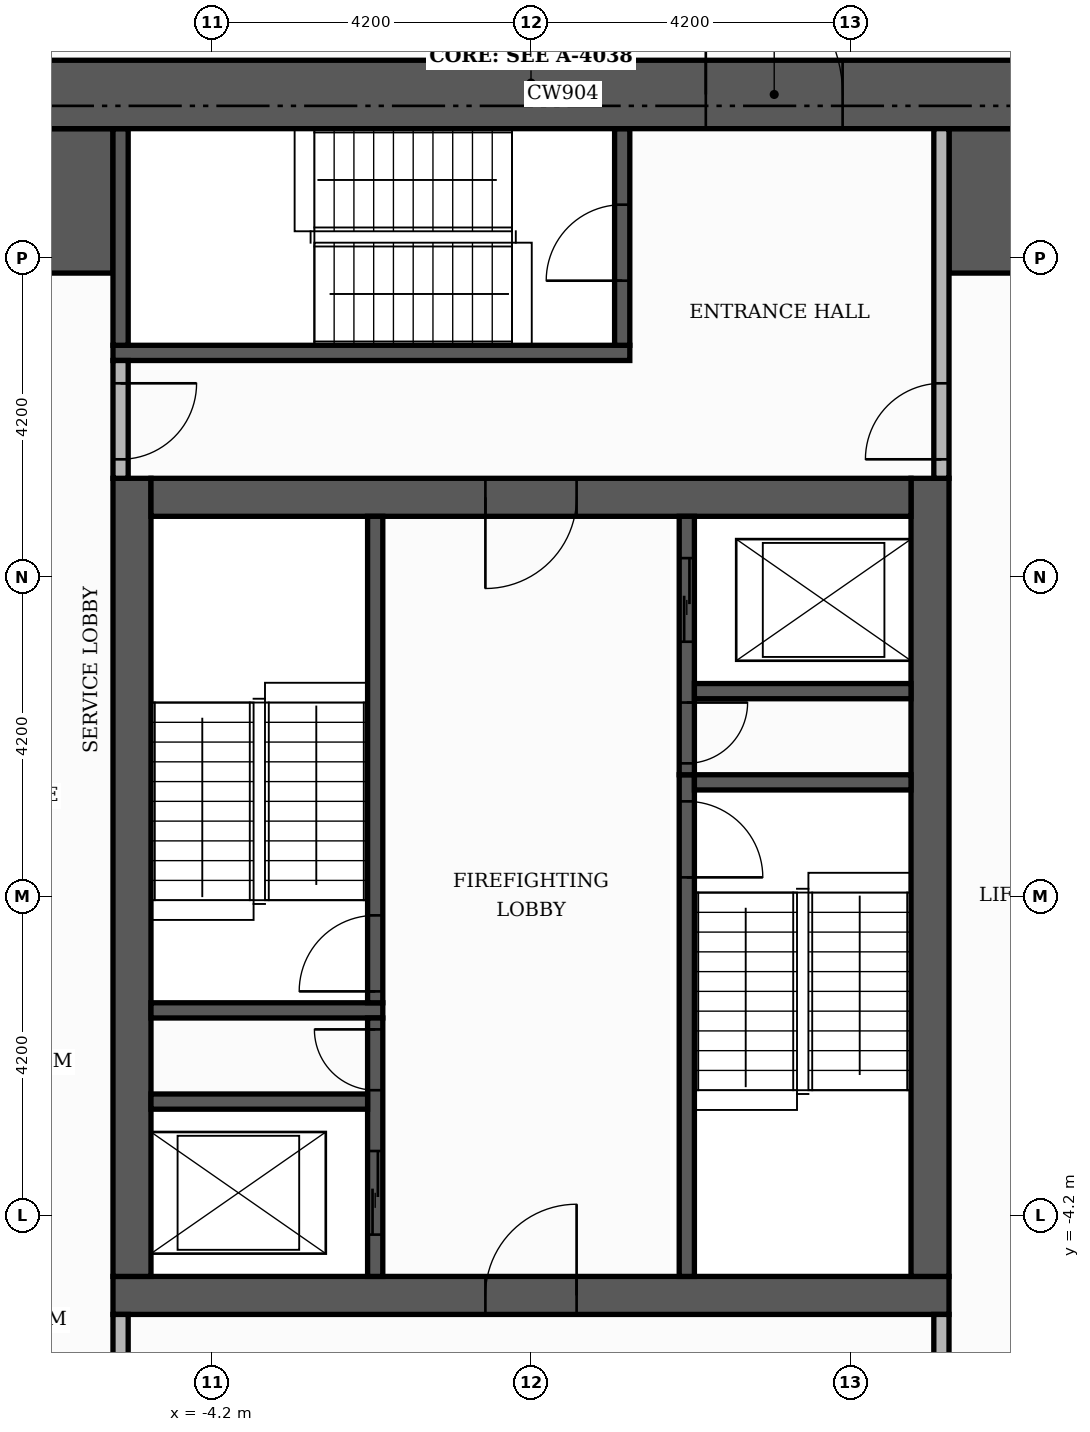
"""IFC4 building model, lengths in metres.
Left out: names, types, materials, properties, quantities, classifications, styles, units other than length and angle.
Written with IfcOpenShell. Run it as: python <this file> out.ifc"""

import sys

from ifc_helpers import new_model, si_unit, direction, frame, frame_2d, origin, place, context, subcontext, project, spatial, rectangle, extrude, element, fill, save


model = new_model("IFC4")
c1 = context("Model", 3, precision=1e-05, world=origin(), true_north=direction((0.0, 1.0)))
c2 = subcontext(c1, "Body", "Model", "MODEL_VIEW")
j1 = project(units=[si_unit("LENGTHUNIT", "METRE"), si_unit("PLANEANGLEUNIT", "RADIAN")], contexts=[c1])
p1 = place(None, origin())
s1 = spatial("IfcSite", under=j1, at=p1, CompositionType="ELEMENT")
p2 = place(p1, origin())
s2 = spatial("IfcBuilding", under=s1, at=p2, CompositionType="ELEMENT")
p3 = place(p2, frame((0.0, 0.0, 231.3)))
s3 = spatial("IfcBuildingStorey", under=s2, at=p3, CompositionType="ELEMENT", Elevation=231.3)
p4 = place(p3, frame((-5.5, -5.25, 0.0), z_axis=(0.0, 0.0, 1.0), x_axis=(1.0, 0.0, 0.0)))
e1 = element("IfcWall", 1, at=p4, inside=s3, PredefinedType="SHEAR", context=c2, shape_type="SweptSolid", body=[
    extrude(rectangle(XDim=11.0, YDim=0.5, at=frame_2d((5.5, 0.0))), origin(), (0.0, 0.0, 1.0), 3.4),
])
p5 = place(p4, frame((4.9, 0.0, 0.0)))
e2 = element("IfcOpeningElement", 2, at=p5, cuts=e1, PredefinedType="OPENING", context=c2, shape_type="SweptSolid", body=[
    extrude(rectangle(XDim=1.2, YDim=2.1, at=frame_2d((0.6, 1.05))), frame((0.0, 0.26, 0.0), z_axis=(0.0, -1.0, 0.0), x_axis=(1.0, 0.0, 0.0)), (0.0, 0.0, 1.0), 0.52),
])
for number, where, z_axis, x_axis in (
    (3, (-5.25, -5.0, 0.0), (0.0, 0.0, 1.0), (0.0, 1.0, 0.0)),
    (4, (5.25, -5.0, 0.0), (0.0, 0.0, 1.0), (0.0, 1.0, 0.0)),
):
    element("IfcWall", number, at=place(p3, frame(where, z_axis=z_axis, x_axis=x_axis)), inside=s3, PredefinedType="SHEAR", context=c2, shape_type="SweptSolid", body=[
        extrude(rectangle(XDim=10.5, YDim=0.5, at=frame_2d((5.25, 0.0))), origin(), (0.0, 0.0, 1.0), 3.4),
    ])
p6 = place(p3, frame((-5.0, 5.25, 0.0), z_axis=(0.0, 0.0, 1.0), x_axis=(1.0, 0.0, 0.0)))
e5 = element("IfcWall", 5, at=p6, inside=s3, PredefinedType="SHEAR", context=c2, shape_type="SweptSolid", body=[
    extrude(rectangle(XDim=10.0, YDim=0.5, at=frame_2d((5.0, 0.0))), origin(), (0.0, 0.0, 1.0), 3.4),
])
p7 = place(p6, frame((4.4, 0.0, 0.0)))
e6 = element("IfcOpeningElement", 6, at=p7, cuts=e5, PredefinedType="OPENING", context=c2, shape_type="SweptSolid", body=[
    extrude(rectangle(XDim=1.2, YDim=2.1, at=frame_2d((0.6, 1.05))), frame((0.0, 0.26, 0.0), z_axis=(0.0, -1.0, 0.0), x_axis=(1.0, 0.0, 0.0)), (0.0, 0.0, 1.0), 0.52),
])
for number, where, z_axis, x_axis in (
    (7, (-10.1, 9.15, 0.0), (0.0, 0.0, 1.0), (1.0, 0.0, 0.0)),
    (8, (5.5, 9.15, 0.0), (0.0, 0.0, 1.0), (1.0, 0.0, 0.0)),
):
    element("IfcWall", number, at=place(p3, frame(where, z_axis=z_axis, x_axis=x_axis)), inside=s3, PredefinedType="SHEAR", context=c2, shape_type="SweptSolid", body=[
        extrude(rectangle(XDim=4.6, YDim=1.9, at=frame_2d((2.3, 0.0))), origin(), (0.0, 0.0, 1.0), 3.4),
    ])
p8 = place(p3, frame((2.05, -5.0, 0.0), z_axis=(0.0, 0.0, 1.0), x_axis=(0.0, 1.0, 0.0)))
e9 = element("IfcWall", 9, at=p8, inside=s3, PredefinedType="SHEAR", context=c2, shape_type="SweptSolid", body=[
    extrude(rectangle(XDim=6.6, YDim=0.2, at=frame_2d((3.3, 0.0))), origin(), (0.0, 0.0, 1.0), 3.4),
])
p9 = place(p8, frame((5.25, 0.0, 0.0)))
e10 = element("IfcOpeningElement", 10, at=p9, cuts=e9, PredefinedType="OPENING", context=c2, shape_type="SweptSolid", body=[
    extrude(rectangle(XDim=1.0, YDim=2.1, at=frame_2d((0.5, 1.05))), frame((0.0, 0.11, 0.0), z_axis=(0.0, -1.0, 0.0), x_axis=(1.0, 0.0, 0.0)), (0.0, 0.0, 1.0), 0.22),
])
p10 = place(p3, frame((-5.0, -1.5, 0.0), z_axis=(0.0, 0.0, 1.0), x_axis=(1.0, 0.0, 0.0)))
e11 = element("IfcWall", 11, at=p10, inside=s3, PredefinedType="SHEAR", context=c2, shape_type="SweptSolid", body=[
    extrude(rectangle(XDim=3.05, YDim=0.2, at=frame_2d((1.525, 0.0))), origin(), (0.0, 0.0, 1.0), 3.4),
])
p11 = place(p3, frame((-2.05, -1.4, 0.0), z_axis=(0.0, 0.0, 1.0), x_axis=(0.0, 1.0, 0.0)))
e12 = element("IfcWall", 12, at=p11, inside=s3, PredefinedType="SHEAR", context=c2, shape_type="SweptSolid", body=[
    extrude(rectangle(XDim=6.4, YDim=0.2, at=frame_2d((3.2, 0.0))), origin(), (0.0, 0.0, 1.0), 3.4),
])
p12 = place(p11, frame((0.15, 0.0, 0.0)))
e13 = element("IfcOpeningElement", 13, at=p12, cuts=e12, PredefinedType="OPENING", context=c2, shape_type="SweptSolid", body=[
    extrude(rectangle(XDim=1.0, YDim=2.1, at=frame_2d((0.5, 1.05))), frame((0.0, 0.11, 0.0), z_axis=(0.0, -1.0, 0.0), x_axis=(1.0, 0.0, 0.0)), (0.0, 0.0, 1.0), 0.22),
])
p13 = place(p3, frame((2.15, 1.5, 0.0), z_axis=(0.0, 0.0, 1.0), x_axis=(1.0, 0.0, 0.0)))
e14 = element("IfcWall", 14, at=p13, inside=s3, PredefinedType="SHEAR", context=c2, shape_type="SweptSolid", body=[
    extrude(rectangle(XDim=2.85, YDim=0.2, at=frame_2d((1.425, 0.0))), origin(), (0.0, 0.0, 1.0), 3.4),
])
p14 = place(p3, frame((-5.5, 7.15, 0.0), z_axis=(0.0, 0.0, 1.0), x_axis=(1.0, 0.0, 0.0)))
e15 = element("IfcWall", 15, at=p14, inside=s3, PredefinedType="SHEAR", context=c2, shape_type="SweptSolid", body=[
    extrude(rectangle(XDim=6.8, YDim=0.2, at=frame_2d((3.4, 0.0))), origin(), (0.0, 0.0, 1.0), 3.4),
])
p15 = place(p3, frame((-5.4, 7.25, 0.0), z_axis=(0.0, 0.0, 1.0), x_axis=(0.0, 1.0, 0.0)))
e16 = element("IfcWall", 16, at=p15, inside=s3, PredefinedType="SHEAR", context=c2, shape_type="SweptSolid", body=[
    extrude(rectangle(XDim=2.85, YDim=0.2, at=frame_2d((1.425, 0.0))), origin(), (0.0, 0.0, 1.0), 3.4),
])
p16 = place(p3, frame((1.2, 7.25, 0.0), z_axis=(0.0, 0.0, 1.0), x_axis=(0.0, 1.0, 0.0)))
e17 = element("IfcWall", 17, at=p16, inside=s3, PredefinedType="SHEAR", context=c2, shape_type="SweptSolid", body=[
    extrude(rectangle(XDim=2.85, YDim=0.2, at=frame_2d((1.425, 0.0))), origin(), (0.0, 0.0, 1.0), 3.4),
])
p17 = place(p16, frame((0.85, 0.0, 0.0)))
e18 = element("IfcOpeningElement", 18, at=p17, cuts=e17, PredefinedType="OPENING", context=c2, shape_type="SweptSolid", body=[
    extrude(rectangle(XDim=1.0, YDim=2.1, at=frame_2d((0.5, 1.05))), frame((0.0, 0.11, 0.0), z_axis=(0.0, -1.0, 0.0), x_axis=(1.0, 0.0, 0.0)), (0.0, 0.0, 1.0), 0.22),
])
p18 = place(p3, frame((-2.05, -5.0, 0.0), z_axis=(0.0, 0.0, 1.0), x_axis=(0.0, 1.0, 0.0)))
e19 = element("IfcWall", 19, at=p18, inside=s3, PredefinedType="SHEAR", context=c2, shape_type="SweptSolid", body=[
    extrude(rectangle(XDim=3.4, YDim=0.2, at=frame_2d((1.7, 0.0))), origin(), (0.0, 0.0, 1.0), 3.4),
])
p19 = place(p18, frame((0.55, 0.0, 0.0)))
e20 = element("IfcOpeningElement", 20, at=p19, cuts=e19, PredefinedType="OPENING", context=c2, shape_type="SweptSolid", body=[
    extrude(rectangle(XDim=1.1, YDim=2.1, at=frame_2d((0.55, 1.05))), frame((0.0, 0.11, 0.0), z_axis=(0.0, -1.0, 0.0), x_axis=(1.0, 0.0, 0.0)), (0.0, 0.0, 1.0), 0.22),
])
p20 = place(p18, frame((2.45, 0.0, 0.0)))
e21 = element("IfcOpeningElement", 21, at=p20, cuts=e19, PredefinedType="OPENING", context=c2, shape_type="SweptSolid", body=[
    extrude(rectangle(XDim=0.8, YDim=2.1, at=frame_2d((0.4, 1.05))), frame((0.0, 0.11, 0.0), z_axis=(0.0, -1.0, 0.0), x_axis=(1.0, 0.0, 0.0)), (0.0, 0.0, 1.0), 0.22),
])
p21 = place(p3, frame((-5.0, -2.7, 0.0), z_axis=(0.0, 0.0, 1.0), x_axis=(1.0, 0.0, 0.0)))
e22 = element("IfcWall", 22, at=p21, inside=s3, PredefinedType="SHEAR", context=c2, shape_type="SweptSolid", body=[
    extrude(rectangle(XDim=2.85, YDim=0.2, at=frame_2d((1.425, 0.0))), origin(), (0.0, 0.0, 1.0), 3.4),
])
p22 = place(p3, frame((2.05, 1.6, 0.0), z_axis=(0.0, 0.0, 1.0), x_axis=(0.0, 1.0, 0.0)))
e23 = element("IfcWall", 23, at=p22, inside=s3, PredefinedType="SHEAR", context=c2, shape_type="SweptSolid", body=[
    extrude(rectangle(XDim=3.4, YDim=0.2, at=frame_2d((1.7, 0.0))), origin(), (0.0, 0.0, 1.0), 3.4),
])
p23 = place(p22, frame((1.75, 0.0, 0.0)))
e24 = element("IfcOpeningElement", 24, at=p23, cuts=e23, PredefinedType="OPENING", context=c2, shape_type="SweptSolid", body=[
    extrude(rectangle(XDim=1.1, YDim=2.1, at=frame_2d((0.55, 1.05))), frame((0.0, 0.11, 0.0), z_axis=(0.0, -1.0, 0.0), x_axis=(1.0, 0.0, 0.0)), (0.0, 0.0, 1.0), 0.22),
])
p24 = place(p22, frame((0.15, 0.0, 0.0)))
e25 = element("IfcOpeningElement", 25, at=p24, cuts=e23, PredefinedType="OPENING", context=c2, shape_type="SweptSolid", body=[
    extrude(rectangle(XDim=0.8, YDim=2.1, at=frame_2d((0.4, 1.05))), frame((0.0, 0.11, 0.0), z_axis=(0.0, -1.0, 0.0), x_axis=(1.0, 0.0, 0.0)), (0.0, 0.0, 1.0), 0.22),
])
p25 = place(p3, frame((2.15, 2.7, 0.0), z_axis=(0.0, 0.0, 1.0), x_axis=(1.0, 0.0, 0.0)))
e26 = element("IfcWall", 26, at=p25, inside=s3, PredefinedType="SHEAR", context=c2, shape_type="SweptSolid", body=[
    extrude(rectangle(XDim=2.85, YDim=0.2, at=frame_2d((1.425, 0.0))), origin(), (0.0, 0.0, 1.0), 3.4),
])
p26 = place(p3, frame((-11.0, 10.55, 0.0), z_axis=(0.0, 0.0, 1.0), x_axis=(1.0, 0.0, 0.0)))
e27 = element("IfcWall", 27, at=p26, inside=s3, PredefinedType="SHEAR", context=c2, shape_type="SweptSolid", body=[
    extrude(rectangle(XDim=22.0, YDim=0.9, at=frame_2d((11.0, 0.0))), origin(), (0.0, 0.0, 1.0), 3.4),
])
p27 = place(p26, frame((13.3, 0.0, 0.0)))
e28 = element("IfcOpeningElement", 28, at=p27, cuts=e27, PredefinedType="OPENING", context=c2, shape_type="SweptSolid", body=[
    extrude(rectangle(XDim=1.8, YDim=2.2, at=frame_2d((0.9, 1.1))), frame((0.0, 0.46, 0.0), z_axis=(0.0, -1.0, 0.0), x_axis=(1.0, 0.0, 0.0)), (0.0, 0.0, 1.0), 0.92),
])
p28 = place(p3, frame((-5.4, -10.1, 0.0), z_axis=(0.0, 0.0, 1.0), x_axis=(0.0, 1.0, 0.0)))
e29 = element("IfcWall", 29, at=p28, inside=s3, PredefinedType="PARTITIONING", context=c2, shape_type="SweptSolid", body=[
    extrude(rectangle(XDim=4.6, YDim=0.2, at=frame_2d((2.3, 0.0))), origin(), (0.0, 0.0, 1.0), 3.4),
])
p29 = place(p28, frame((2.9, 0.0, 0.0)))
e30 = element("IfcOpeningElement", 30, at=p29, cuts=e29, PredefinedType="OPENING", context=c2, shape_type="SweptSolid", body=[
    extrude(rectangle(XDim=1.0, YDim=2.1, at=frame_2d((0.5, 1.05))), frame((0.0, 0.11, 0.0), z_axis=(0.0, -1.0, 0.0), x_axis=(1.0, 0.0, 0.0)), (0.0, 0.0, 1.0), 0.22),
])
p30 = place(p3, frame((5.4, -10.1, 0.0), z_axis=(0.0, 0.0, 1.0), x_axis=(0.0, 1.0, 0.0)))
e31 = element("IfcWall", 31, at=p30, inside=s3, PredefinedType="PARTITIONING", context=c2, shape_type="SweptSolid", body=[
    extrude(rectangle(XDim=4.6, YDim=0.2, at=frame_2d((2.3, 0.0))), origin(), (0.0, 0.0, 1.0), 3.4),
])
p31 = place(p30, frame((2.9, 0.0, 0.0)))
e32 = element("IfcOpeningElement", 32, at=p31, cuts=e31, PredefinedType="OPENING", context=c2, shape_type="SweptSolid", body=[
    extrude(rectangle(XDim=1.0, YDim=2.1, at=frame_2d((0.5, 1.05))), frame((0.0, 0.11, 0.0), z_axis=(0.0, -1.0, 0.0), x_axis=(1.0, 0.0, 0.0)), (0.0, 0.0, 1.0), 0.22),
])
p32 = place(p3, frame((-5.4, 5.5, 0.0), z_axis=(0.0, 0.0, 1.0), x_axis=(0.0, 1.0, 0.0)))
e33 = element("IfcWall", 33, at=p32, inside=s3, PredefinedType="PARTITIONING", context=c2, shape_type="SweptSolid", body=[
    extrude(rectangle(XDim=1.55, YDim=0.2, at=frame_2d((0.775, 0.0))), origin(), (0.0, 0.0, 1.0), 3.4),
])
p33 = place(p32, frame((0.25, 0.0, 0.0)))
e34 = element("IfcOpeningElement", 34, at=p33, cuts=e33, PredefinedType="OPENING", context=c2, shape_type="SweptSolid", body=[
    extrude(rectangle(XDim=1.0, YDim=2.1, at=frame_2d((0.5, 1.05))), frame((0.0, 0.11, 0.0), z_axis=(0.0, -1.0, 0.0), x_axis=(1.0, 0.0, 0.0)), (0.0, 0.0, 1.0), 0.22),
])
p34 = place(p3, frame((5.4, 5.5, 0.0), z_axis=(0.0, 0.0, 1.0), x_axis=(0.0, 1.0, 0.0)))
e35 = element("IfcWall", 35, at=p34, inside=s3, PredefinedType="PARTITIONING", context=c2, shape_type="SweptSolid", body=[
    extrude(rectangle(XDim=4.6, YDim=0.2, at=frame_2d((2.3, 0.0))), origin(), (0.0, 0.0, 1.0), 3.4),
])
p35 = place(p34, frame((0.25, 0.0, 0.0)))
e36 = element("IfcOpeningElement", 36, at=p35, cuts=e35, PredefinedType="OPENING", context=c2, shape_type="SweptSolid", body=[
    extrude(rectangle(XDim=1.0, YDim=2.1, at=frame_2d((0.5, 1.05))), frame((0.0, 0.11, 0.0), z_axis=(0.0, -1.0, 0.0), x_axis=(1.0, 0.0, 0.0)), (0.0, 0.0, 1.0), 0.22),
])
p36 = place(p23, origin())
e37 = element("IfcDoor", 37, at=p36, inside=s3, OperationType="SLIDING_TO_LEFT", PredefinedType="DOOR", context=c2, shape_type="SweptSolid", body=[
    extrude(rectangle(XDim=1.1, YDim=2.1, at=frame_2d((0.55, 1.05))), frame((0.0, 0.025, 0.0), z_axis=(0.0, -1.0, 0.0), x_axis=(1.0, 0.0, 0.0)), (0.0, 0.0, 1.0), 0.05),
])
fill(e24, e37)
p37 = place(p19, origin())
e38 = element("IfcDoor", 38, at=p37, inside=s3, OperationType="SLIDING_TO_LEFT", PredefinedType="DOOR", context=c2, shape_type="SweptSolid", body=[
    extrude(rectangle(XDim=1.1, YDim=2.1, at=frame_2d((0.55, 1.05))), frame((0.0, 0.025, 0.0), z_axis=(0.0, -1.0, 0.0), x_axis=(1.0, 0.0, 0.0)), (0.0, 0.0, 1.0), 0.05),
])
fill(e20, e38)
p38 = place(p12, origin())
e39 = element("IfcDoor", 39, at=p38, inside=s3, OperationType="SINGLE_SWING_LEFT", PredefinedType="DOOR", context=c2, shape_type="SweptSolid", body=[
    extrude(rectangle(XDim=1.0, YDim=2.1, at=frame_2d((0.5, 1.05))), frame((0.0, 0.025, 0.0), z_axis=(0.0, -1.0, 0.0), x_axis=(1.0, 0.0, 0.0)), (0.0, 0.0, 1.0), 0.05),
])
fill(e13, e39)
p39 = place(p9, frame((1.0, 0.0, 0.0), z_axis=(0.0, 0.0, 1.0), x_axis=(-1.0, 0.0, 0.0)))
e40 = element("IfcDoor", 40, at=p39, inside=s3, OperationType="SINGLE_SWING_LEFT", PredefinedType="DOOR", context=c2, shape_type="SweptSolid", body=[
    extrude(rectangle(XDim=1.0, YDim=2.1, at=frame_2d((0.5, 1.05))), frame((0.0, 0.025, 0.0), z_axis=(0.0, -1.0, 0.0), x_axis=(1.0, 0.0, 0.0)), (0.0, 0.0, 1.0), 0.05),
])
fill(e10, e40)
p40 = place(p24, frame((0.8, 0.0, 0.0), z_axis=(0.0, 0.0, 1.0), x_axis=(-1.0, 0.0, 0.0)))
e41 = element("IfcDoor", 41, at=p40, inside=s3, OperationType="SINGLE_SWING_RIGHT", PredefinedType="DOOR", context=c2, shape_type="SweptSolid", body=[
    extrude(rectangle(XDim=0.8, YDim=2.1, at=frame_2d((0.4, 1.05))), frame((0.0, 0.025, 0.0), z_axis=(0.0, -1.0, 0.0), x_axis=(1.0, 0.0, 0.0)), (0.0, 0.0, 1.0), 0.05),
])
fill(e25, e41)
p41 = place(p20, origin())
e42 = element("IfcDoor", 42, at=p41, inside=s3, OperationType="SINGLE_SWING_RIGHT", PredefinedType="DOOR", context=c2, shape_type="SweptSolid", body=[
    extrude(rectangle(XDim=0.8, YDim=2.1, at=frame_2d((0.4, 1.05))), frame((0.0, 0.025, 0.0), z_axis=(0.0, -1.0, 0.0), x_axis=(1.0, 0.0, 0.0)), (0.0, 0.0, 1.0), 0.05),
])
fill(e21, e42)
p42 = place(p7, frame((1.2, 0.0, 0.0), z_axis=(0.0, 0.0, 1.0), x_axis=(-1.0, 0.0, 0.0)))
e43 = element("IfcDoor", 43, at=p42, inside=s3, OperationType="SINGLE_SWING_LEFT", PredefinedType="DOOR", context=c2, shape_type="SweptSolid", body=[
    extrude(rectangle(XDim=1.2, YDim=2.1, at=frame_2d((0.6, 1.05))), frame((0.0, 0.025, 0.0), z_axis=(0.0, -1.0, 0.0), x_axis=(1.0, 0.0, 0.0)), (0.0, 0.0, 1.0), 0.05),
])
fill(e6, e43)
p43 = place(p5, origin())
e44 = element("IfcDoor", 44, at=p43, inside=s3, OperationType="SINGLE_SWING_RIGHT", PredefinedType="DOOR", context=c2, shape_type="SweptSolid", body=[
    extrude(rectangle(XDim=1.2, YDim=2.1, at=frame_2d((0.6, 1.05))), frame((0.0, 0.025, 0.0), z_axis=(0.0, -1.0, 0.0), x_axis=(1.0, 0.0, 0.0)), (0.0, 0.0, 1.0), 0.05),
])
fill(e2, e44)
p44 = place(p17, origin())
e45 = element("IfcDoor", 45, at=p44, inside=s3, OperationType="SINGLE_SWING_LEFT", PredefinedType="DOOR", context=c2, shape_type="SweptSolid", body=[
    extrude(rectangle(XDim=1.0, YDim=2.1, at=frame_2d((0.5, 1.05))), frame((0.0, 0.025, 0.0), z_axis=(0.0, -1.0, 0.0), x_axis=(1.0, 0.0, 0.0)), (0.0, 0.0, 1.0), 0.05),
])
fill(e18, e45)
p45 = place(p33, frame((1.0, 0.0, 0.0), z_axis=(0.0, 0.0, 1.0), x_axis=(-1.0, 0.0, 0.0)))
e46 = element("IfcDoor", 46, at=p45, inside=s3, OperationType="SINGLE_SWING_RIGHT", PredefinedType="DOOR", context=c2, shape_type="SweptSolid", body=[
    extrude(rectangle(XDim=1.0, YDim=2.1, at=frame_2d((0.5, 1.05))), frame((0.0, 0.025, 0.0), z_axis=(0.0, -1.0, 0.0), x_axis=(1.0, 0.0, 0.0)), (0.0, 0.0, 1.0), 0.05),
])
fill(e34, e46)
p46 = place(p35, origin())
e47 = element("IfcDoor", 47, at=p46, inside=s3, OperationType="SINGLE_SWING_LEFT", PredefinedType="DOOR", context=c2, shape_type="SweptSolid", body=[
    extrude(rectangle(XDim=1.0, YDim=2.1, at=frame_2d((0.5, 1.05))), frame((0.0, 0.025, 0.0), z_axis=(0.0, -1.0, 0.0), x_axis=(1.0, 0.0, 0.0)), (0.0, 0.0, 1.0), 0.05),
])
fill(e36, e47)
p47 = place(p27, origin())
e48 = element("IfcDoor", 48, at=p47, inside=s3, OperationType="DOUBLE_DOOR_SINGLE_SWING", PredefinedType="DOOR", context=c2, shape_type="SweptSolid", body=[
    extrude(rectangle(XDim=1.8, YDim=2.2, at=frame_2d((0.9, 1.1))), frame((0.0, 0.025, 0.0), z_axis=(0.0, -1.0, 0.0), x_axis=(1.0, 0.0, 0.0)), (0.0, 0.0, 1.0), 0.05),
])
fill(e28, e48)
save(model, sys.argv[1])
